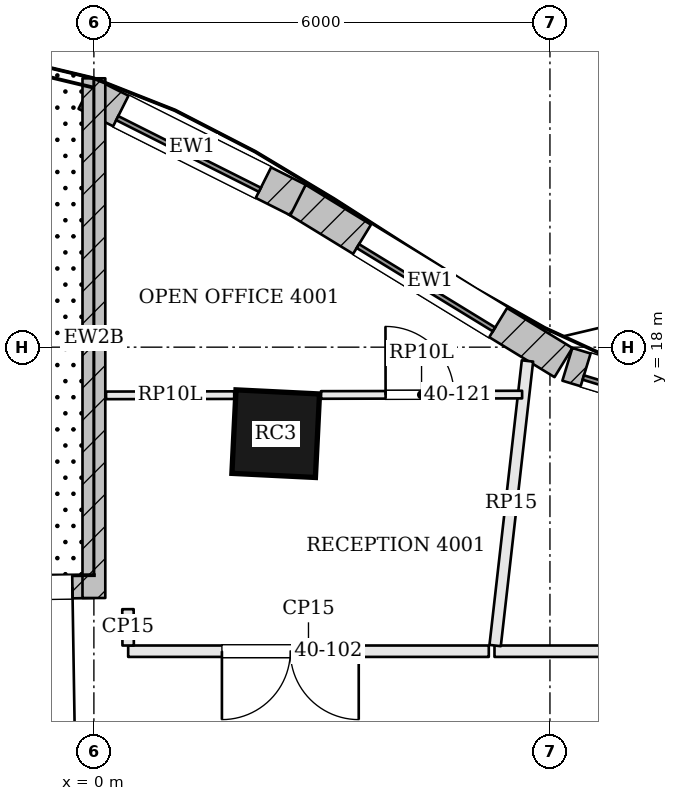
"""IFC4 building model, lengths in metres.
Left out: names, types, materials, properties, quantities, classifications, styles, units other than length and angle.
Written with IfcOpenShell. Run it as: python <this file> out.ifc"""

import sys

from ifc_helpers import new_model, si_unit, direction, frame, frame_2d, origin, origin_2d, place, context, subcontext, project, spatial, rectangle, extrude, element, fill, save


model = new_model("IFC4")
c1 = context("Model", 3, precision=1e-05, world=origin(), true_north=direction((0.0, 1.0)))
c2 = subcontext(c1, "Body", "Model", "MODEL_VIEW")
j1 = project(units=[si_unit("LENGTHUNIT", "METRE"), si_unit("PLANEANGLEUNIT", "RADIAN")], contexts=[c1])
p1 = place(None, origin())
s1 = spatial("IfcSite", under=j1, at=p1, CompositionType="ELEMENT")
p2 = place(p1, origin())
s2 = spatial("IfcBuilding", under=s1, at=p2, CompositionType="ELEMENT")
p3 = place(p2, frame((0.0, 0.0, 165.6)))
s3 = spatial("IfcBuildingStorey", under=s2, at=p3, CompositionType="ELEMENT", Elevation=165.6)
p4 = place(p3, frame((2.392, 16.862, 0.0), z_axis=(0.0, 0.0, 1.0), x_axis=(-0.998791416829, 0.049149828786, 0.0)))
e1 = element("IfcColumn", 1, at=p4, inside=s3, PredefinedType="COLUMN", context=c2, shape_type="SweptSolid", body=[
    extrude(rectangle(XDim=1.1, YDim=1.1, at=origin_2d()), origin(), (0.0, 0.0, 1.0), 3.1),
])
p5 = place(p3, frame((8.718, 17.017, 0.0), z_axis=(0.0, 0.0, 1.0), x_axis=(-0.956643192195, 0.291262429482, 0.0)))
e2 = element("IfcWall", 2, at=p5, inside=s3, PredefinedType="SOLIDWALL", context=c2, shape_type="SweptSolid", body=[
    extrude(rectangle(XDim=2.602, YDim=0.45, at=frame_2d((1.301, 0.0))), origin(), (0.0, 0.0, 1.0), 3.6),
])
p6 = place(p5, frame((0.251, 0.0, 0.9)))
e3 = element("IfcOpeningElement", 3, at=p6, cuts=e2, PredefinedType="OPENING", context=c2, shape_type="SweptSolid", body=[
    extrude(rectangle(XDim=2.1, YDim=1.8, at=frame_2d((1.05, 0.9))), frame((0.0, 0.235, 0.0), z_axis=(0.0, -1.0, 0.0), x_axis=(1.0, 0.0, 0.0)), (0.0, 0.0, 1.0), 0.47),
])
p7 = place(p3, frame((6.177, 17.798, 0.0), z_axis=(0.0, 0.0, 1.0), x_axis=(-0.852939764965, 0.52200934603, 0.0)))
e4 = element("IfcWall", 4, at=p7, inside=s3, PredefinedType="SOLIDWALL", context=c2, shape_type="SweptSolid", body=[
    extrude(rectangle(XDim=4.113, YDim=0.45, at=frame_2d((2.056, 0.0))), origin(), (0.0, 0.0, 1.0), 3.6),
])
p8 = place(p7, frame((1.006, 0.0, 0.9)))
e5 = element("IfcOpeningElement", 5, at=p8, cuts=e4, PredefinedType="OPENING", context=c2, shape_type="SweptSolid", body=[
    extrude(rectangle(XDim=2.1, YDim=1.8, at=frame_2d((1.05, 0.9))), frame((0.0, 0.235, 0.0), z_axis=(0.0, -1.0, 0.0), x_axis=(1.0, 0.0, 0.0)), (0.0, 0.0, 1.0), 0.47),
])
p9 = place(p3, frame((2.686, 19.936, 0.0), z_axis=(0.0, 0.0, 1.0), x_axis=(-0.893533051512, 0.448997422994, 0.0)))
e6 = element("IfcWall", 6, at=p9, inside=s3, PredefinedType="SOLIDWALL", context=c2, shape_type="SweptSolid", body=[
    extrude(rectangle(XDim=3.119, YDim=0.45, at=frame_2d((1.56, 0.0))), origin(), (0.0, 0.0, 1.0), 3.6),
])
p10 = place(p9, frame((0.51, 0.0, 0.9)))
e7 = element("IfcOpeningElement", 7, at=p10, cuts=e6, PredefinedType="OPENING", context=c2, shape_type="SweptSolid", body=[
    extrude(rectangle(XDim=2.1, YDim=1.8, at=frame_2d((1.05, 0.9))), frame((0.0, 0.235, 0.0), z_axis=(0.0, -1.0, 0.0), x_axis=(1.0, 0.0, 0.0)), (0.0, 0.0, 1.0), 0.47),
])
p11 = place(p3, frame((0.002, 14.85, 0.0), z_axis=(0.0, 0.0, 1.0), x_axis=(-0.999870915063, -0.016067146966, 0.0)))
e8 = element("IfcWall", 8, at=p11, inside=s3, PredefinedType="SOLIDWALL", context=c2, shape_type="SweptSolid", body=[
    extrude(rectangle(XDim=2.37, YDim=0.3, at=frame_2d((1.185, 0.0))), origin(), (0.0, 0.0, 1.0), 3.3),
])
p12 = place(p11, frame((0.285, 0.0, 0.0)))
e9 = element("IfcOpeningElement", 9, at=p12, cuts=e8, PredefinedType="OPENING", context=c2, shape_type="SweptSolid", body=[
    extrude(rectangle(XDim=1.8, YDim=2.4, at=frame_2d((0.9, 1.2))), frame((0.0, 0.16, 0.0), z_axis=(0.0, -1.0, 0.0), x_axis=(1.0, 0.0, 0.0)), (0.0, 0.0, 1.0), 0.32),
])
p13 = place(p3, frame((0.0, 21.537, 0.0), z_axis=(0.0, 0.0, 1.0), x_axis=(0.0, -1.0, 0.0)))
e10 = element("IfcWall", 10, at=p13, inside=s3, PredefinedType="SOLIDWALL", context=c2, shape_type="SweptSolid", body=[
    extrude(rectangle(XDim=6.837, YDim=0.3, at=frame_2d((3.418, 0.0))), origin(), (0.0, 0.0, 1.0), 3.21),
])
p14 = place(p3, frame((14.925, 14.0, 0.0), z_axis=(0.0, 0.0, 1.0), x_axis=(-1.0, 0.0, 0.0)))
e11 = element("IfcWall", 11, at=p14, inside=s3, PredefinedType="PARTITIONING", context=c2, shape_type="SweptSolid", body=[
    extrude(rectangle(XDim=9.655, YDim=0.15, at=frame_2d((4.827, 0.0))), origin(), (0.0, 0.0, 1.0), 2.58),
])
p15 = place(p3, frame((5.704, 17.819, 0.0), z_axis=(0.0, 0.0, 1.0), x_axis=(-0.112863169051, -0.993610539936, 0.0)))
e12 = element("IfcWall", 12, at=p15, inside=s3, PredefinedType="PARTITIONING", context=c2, shape_type="SweptSolid", body=[
    extrude(rectangle(XDim=3.768, YDim=0.15, at=frame_2d((1.884, 0.0))), origin(), (0.0, 0.0, 1.0), 3.19),
])
p16 = place(p3, frame((5.195, 14.0, 0.0), z_axis=(0.0, 0.0, 1.0), x_axis=(-1.0, 0.0, 0.0)))
e13 = element("IfcWall", 13, at=p16, inside=s3, PredefinedType="PARTITIONING", context=c2, shape_type="SweptSolid", body=[
    extrude(rectangle(XDim=4.744, YDim=0.15, at=frame_2d((2.372, 0.0))), origin(), (0.0, 0.0, 1.0), 3.098),
])
p17 = place(p16, frame((1.711, 0.0, 0.0)))
e14 = element("IfcOpeningElement", 14, at=p17, cuts=e13, PredefinedType="OPENING", context=c2, shape_type="SweptSolid", body=[
    extrude(rectangle(XDim=1.8, YDim=2.1, at=frame_2d((0.9, 1.05))), frame((0.0, 0.085, 0.0), z_axis=(0.0, -1.0, 0.0), x_axis=(1.0, 0.0, 0.0)), (0.0, 0.0, 1.0), 0.17),
])
p18 = place(p3, frame((0.451, 14.075, 0.0), z_axis=(0.0, 0.0, 1.0), x_axis=(-0.005617888874, 0.999984219538, 0.0)))
e15 = element("IfcWall", 15, at=p18, inside=s3, PredefinedType="PARTITIONING", context=c2, shape_type="SweptSolid", body=[
    extrude(rectangle(XDim=0.478, YDim=0.15, at=frame_2d((0.239, 0.0))), origin(), (0.0, 0.0, 1.0), 3.098),
])
p19 = place(p3, frame((0.16, 17.366, 0.0), z_axis=(0.0, 0.0, 1.0), x_axis=(0.999998228763, 0.001882145211, 0.0)))
e16 = element("IfcWall", 16, at=p19, inside=s3, PredefinedType="PARTITIONING", context=c2, shape_type="SweptSolid", body=[
    extrude(rectangle(XDim=1.686, YDim=0.1, at=frame_2d((0.843, 0.0))), origin(), (0.0, 0.0, 1.0), 2.58),
])
p20 = place(p3, frame((2.988, 17.371, 0.0), z_axis=(0.0, 0.0, 1.0), x_axis=(0.999998122806, 0.001937623231, 0.0)))
e17 = element("IfcWall", 17, at=p20, inside=s3, PredefinedType="PARTITIONING", context=c2, shape_type="SweptSolid", body=[
    extrude(rectangle(XDim=2.646, YDim=0.1, at=frame_2d((1.323, 0.0))), origin(), (0.0, 0.0, 1.0), 2.58),
])
p21 = place(p20, frame((0.85, 0.0, 0.0)))
e18 = element("IfcOpeningElement", 18, at=p21, cuts=e17, PredefinedType="OPENING", context=c2, shape_type="SweptSolid", body=[
    extrude(rectangle(XDim=0.9, YDim=2.1, at=frame_2d((0.45, 1.05))), frame((0.0, 0.06, 0.0), z_axis=(0.0, -1.0, 0.0), x_axis=(1.0, 0.0, 0.0)), (0.0, 0.0, 1.0), 0.12),
])
p22 = place(p6, origin())
e19 = element("IfcWindow", 19, at=p22, inside=s3, PartitioningType="SINGLE_PANEL", PredefinedType="WINDOW", context=c2, shape_type="SweptSolid", body=[
    extrude(rectangle(XDim=2.1, YDim=1.8, at=frame_2d((1.05, 0.9))), frame((0.0, 0.135, 0.0), z_axis=(0.0, -1.0, 0.0), x_axis=(1.0, 0.0, 0.0)), (0.0, 0.0, 1.0), 0.06),
])
fill(e3, e19)
p23 = place(p8, origin())
e20 = element("IfcWindow", 20, at=p23, inside=s3, PartitioningType="SINGLE_PANEL", PredefinedType="WINDOW", context=c2, shape_type="SweptSolid", body=[
    extrude(rectangle(XDim=2.1, YDim=1.8, at=frame_2d((1.05, 0.9))), frame((0.0, 0.135, 0.0), z_axis=(0.0, -1.0, 0.0), x_axis=(1.0, 0.0, 0.0)), (0.0, 0.0, 1.0), 0.06),
])
fill(e5, e20)
p24 = place(p10, origin())
e21 = element("IfcWindow", 21, at=p24, inside=s3, PartitioningType="SINGLE_PANEL", PredefinedType="WINDOW", context=c2, shape_type="SweptSolid", body=[
    extrude(rectangle(XDim=2.1, YDim=1.8, at=frame_2d((1.05, 0.9))), frame((0.0, 0.135, 0.0), z_axis=(0.0, -1.0, 0.0), x_axis=(1.0, 0.0, 0.0)), (0.0, 0.0, 1.0), 0.06),
])
fill(e7, e21)
p25 = place(p12, origin())
e22 = element("IfcDoor", 22, at=p25, inside=s3, OperationType="DOUBLE_DOOR_DOUBLE_SWING", PredefinedType="DOOR", context=c2, shape_type="SweptSolid", body=[
    extrude(rectangle(XDim=1.8, YDim=2.4, at=frame_2d((0.9, 1.2))), frame((0.0, 0.025, 0.0), z_axis=(0.0, -1.0, 0.0), x_axis=(1.0, 0.0, 0.0)), (0.0, 0.0, 1.0), 0.05),
])
fill(e9, e22)
p26 = place(p17, origin())
e23 = element("IfcDoor", 23, at=p26, inside=s3, OperationType="DOUBLE_DOOR_SINGLE_SWING", PredefinedType="DOOR", context=c2, shape_type="SweptSolid", body=[
    extrude(rectangle(XDim=1.8, YDim=2.1, at=frame_2d((0.9, 1.05))), frame((0.0, 0.025, 0.0), z_axis=(0.0, -1.0, 0.0), x_axis=(1.0, 0.0, 0.0)), (0.0, 0.0, 1.0), 0.05),
])
fill(e14, e23)
p27 = place(p21, origin())
e24 = element("IfcDoor", 24, at=p27, inside=s3, OperationType="SINGLE_SWING_LEFT", PredefinedType="DOOR", context=c2, shape_type="SweptSolid", body=[
    extrude(rectangle(XDim=0.9, YDim=2.1, at=frame_2d((0.45, 1.05))), frame((0.0, 0.025, 0.0), z_axis=(0.0, -1.0, 0.0), x_axis=(1.0, 0.0, 0.0)), (0.0, 0.0, 1.0), 0.05),
])
fill(e18, e24)
save(model, sys.argv[1])
